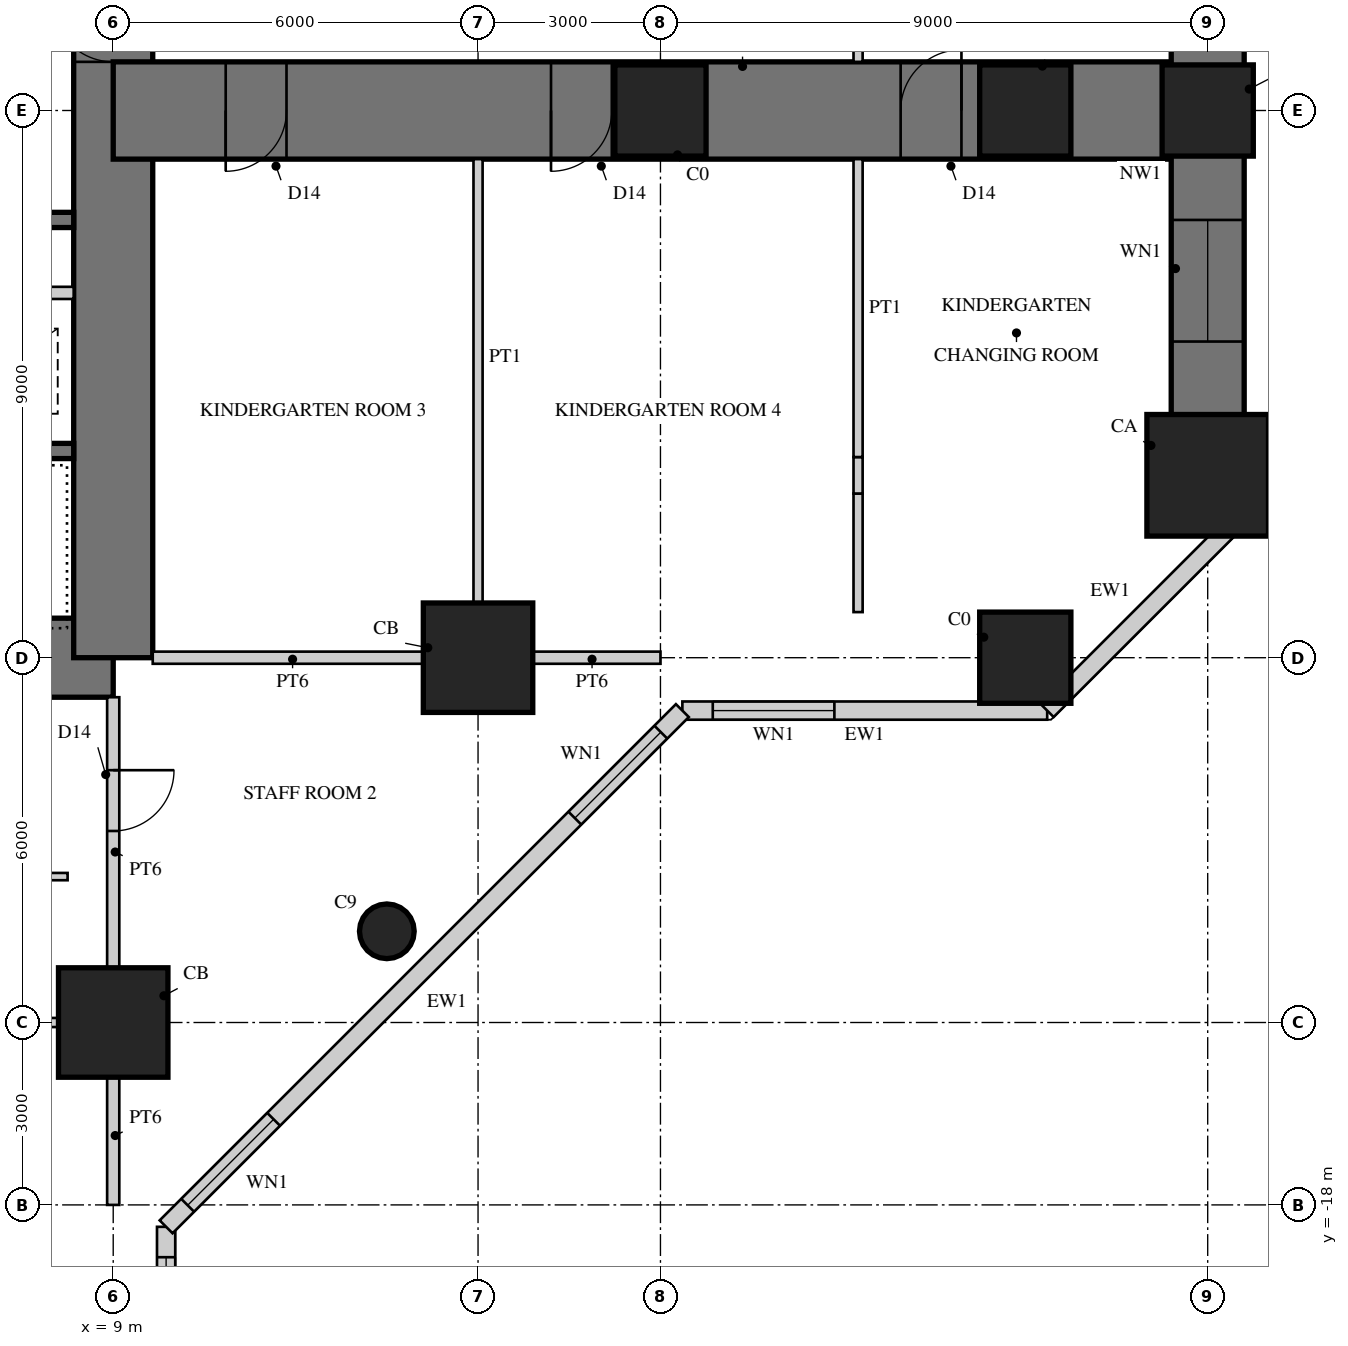
"""IFC4 building model, lengths in metres.
Left out: names, types, materials, properties, quantities, classifications, styles, units other than length and angle.
Written with IfcOpenShell. Run it as: python <this file> out.ifc"""

import sys

from ifc_helpers import new_model, si_unit, direction, frame, frame_2d, origin, origin_2d, place, context, subcontext, project, spatial, rectangle, hollow_rectangle, circle, extrude, element, fill, save


model = new_model("IFC4")
c1 = context("Model", 3, precision=1e-05, world=origin(), true_north=direction((0.0, 1.0)))
c2 = subcontext(c1, "Body", "Model", "MODEL_VIEW")
j1 = project(units=[si_unit("LENGTHUNIT", "METRE"), si_unit("PLANEANGLEUNIT", "RADIAN")], contexts=[c1])
p1 = place(None, origin())
s1 = spatial("IfcSite", under=j1, at=p1, CompositionType="ELEMENT")
p2 = place(p1, origin())
s2 = spatial("IfcBuilding", under=s1, at=p2, CompositionType="ELEMENT")
p3 = place(p2, frame((0.0, 0.0, 5.0)))
s3 = spatial("IfcBuildingStorey", under=s2, at=p3, CompositionType="ELEMENT", Elevation=5.0)
p4 = place(p3, frame((-9.0, -9.0, 0.0), z_axis=(0.0, 0.0, 1.0), x_axis=(1.0, 0.0, 0.0)))
e1 = element("IfcWall", 1, at=p4, inside=s3, PredefinedType="SHEAR", context=c2, shape_type="SweptSolid", body=[
    extrude(rectangle(XDim=18.0, YDim=1.3, at=frame_2d((9.0, 0.0))), origin(), (0.0, 0.0, 1.0), 4.5),
])
p5 = place(p4, frame((9.8, 0.0, 0.0)))
e2 = element("IfcOpeningElement", 2, at=p5, cuts=e1, PredefinedType="OPENING", context=c2, shape_type="SweptSolid", body=[
    extrude(rectangle(XDim=1.0, YDim=2.4, at=frame_2d((0.5, 1.2))), frame((0.0, 0.66, 0.0), z_axis=(0.0, -1.0, 0.0), x_axis=(1.0, 0.0, 0.0)), (0.0, 0.0, 1.0), 1.32),
])
p6 = place(p3, frame((9.0, -9.0, 0.0), z_axis=(0.0, 0.0, 1.0), x_axis=(0.0, 1.0, 0.0)))
e3 = element("IfcWall", 3, at=p6, inside=s3, PredefinedType="SHEAR", context=c2, shape_type="SweptSolid", body=[
    extrude(rectangle(XDim=18.0, YDim=1.3, at=frame_2d((9.0, 0.0))), origin(), (0.0, 0.0, 1.0), 4.5),
])
p7 = place(p6, frame((9.8, 0.0, 0.0)))
e4 = element("IfcOpeningElement", 4, at=p7, cuts=e3, PredefinedType="OPENING", context=c2, shape_type="SweptSolid", body=[
    extrude(rectangle(XDim=1.0, YDim=2.4, at=frame_2d((0.5, 1.2))), frame((0.0, 0.66, 0.0), z_axis=(0.0, -1.0, 0.0), x_axis=(1.0, 0.0, 0.0)), (0.0, 0.0, 1.0), 1.32),
])
p8 = place(p3, frame((2.125, -1.8, 0.0), z_axis=(0.0, 0.0, 1.0), x_axis=(1.0, 0.0, 0.0)))
e5 = element("IfcWall", 5, at=p8, inside=s3, PredefinedType="SHEAR", context=c2, shape_type="SweptSolid", body=[
    extrude(rectangle(XDim=6.225, YDim=0.25, at=frame_2d((3.113, 0.0))), origin(), (0.0, 0.0, 1.0), 4.5),
])
p9 = place(p3, frame((2.125, -5.6, 0.0), z_axis=(0.0, 0.0, 1.0), x_axis=(1.0, 0.0, 0.0)))
e6 = element("IfcWall", 6, at=p9, inside=s3, PredefinedType="SHEAR", context=c2, shape_type="SweptSolid", body=[
    extrude(rectangle(XDim=6.225, YDim=0.25, at=frame_2d((3.113, 0.0))), origin(), (0.0, 0.0, 1.0), 4.5),
])
p10 = place(p9, frame((0.175, 0.0, 0.0)))
e7 = element("IfcOpeningElement", 7, at=p10, cuts=e6, PredefinedType="OPENING", context=c2, shape_type="SweptSolid", body=[
    extrude(rectangle(XDim=1.0, YDim=2.1, at=frame_2d((0.5, 1.05))), frame((0.0, 0.135, 0.0), z_axis=(0.0, -1.0, 0.0), x_axis=(1.0, 0.0, 0.0)), (0.0, 0.0, 1.0), 0.27),
])
p11 = place(p3, frame((5.725, -3.0, 0.0), z_axis=(0.0, 0.0, 1.0), x_axis=(1.0, 0.0, 0.0)))
e8 = element("IfcWall", 8, at=p11, inside=s3, PredefinedType="PARTITIONING", context=c2, shape_type="SweptSolid", body=[
    extrude(rectangle(XDim=2.625, YDim=0.2, at=frame_2d((1.312, 0.0))), origin(), (0.0, 0.0, 1.0), 4.5),
])
p12 = place(p3, frame((9.0, 0.0, 0.0), z_axis=(0.0, 0.0, 1.0), x_axis=(1.0, 0.0, 0.0)))
e9 = element("IfcWall", 9, at=p12, inside=s3, PredefinedType="SHEAR", context=c2, shape_type="SweptSolid", body=[
    extrude(rectangle(XDim=18.0, YDim=1.6, at=frame_2d((9.0, 0.0))), origin(), (0.0, 0.0, 1.0), 4.5),
])
p13 = place(p12, frame((1.85, 0.0, 0.0)))
e10 = element("IfcOpeningElement", 10, at=p13, cuts=e9, PredefinedType="OPENING", context=c2, shape_type="SweptSolid", body=[
    extrude(rectangle(XDim=1.0, YDim=2.2, at=frame_2d((0.5, 1.1))), frame((0.0, 0.81, 0.0), z_axis=(0.0, -1.0, 0.0), x_axis=(1.0, 0.0, 0.0)), (0.0, 0.0, 1.0), 1.62),
])
p14 = place(p12, frame((7.2, 0.0, 0.0)))
e11 = element("IfcOpeningElement", 11, at=p14, cuts=e9, PredefinedType="OPENING", context=c2, shape_type="SweptSolid", body=[
    extrude(rectangle(XDim=1.0, YDim=2.2, at=frame_2d((0.5, 1.1))), frame((0.0, 0.81, 0.0), z_axis=(0.0, -1.0, 0.0), x_axis=(1.0, 0.0, 0.0)), (0.0, 0.0, 1.0), 1.62),
])
p15 = place(p12, frame((12.95, 0.0, 0.0)))
e12 = element("IfcOpeningElement", 12, at=p15, cuts=e9, PredefinedType="OPENING", context=c2, shape_type="SweptSolid", body=[
    extrude(rectangle(XDim=1.0, YDim=2.2, at=frame_2d((0.5, 1.1))), frame((0.0, 0.81, 0.0), z_axis=(0.0, -1.0, 0.0), x_axis=(1.0, 0.0, 0.0)), (0.0, 0.0, 1.0), 1.62),
])
p16 = place(p3, frame((27.0, -6.0, 0.0), z_axis=(0.0, 0.0, 1.0), x_axis=(0.0, 1.0, 0.0)))
e13 = element("IfcWall", 13, at=p16, inside=s3, PredefinedType="SHEAR", context=c2, shape_type="SweptSolid", body=[
    extrude(rectangle(XDim=12.0, YDim=1.2, at=frame_2d((6.0, 0.0))), origin(), (0.0, 0.0, 1.0), 4.5),
])
p17 = place(p16, frame((2.2, 0.0, 0.9)))
e14 = element("IfcOpeningElement", 14, at=p17, cuts=e13, PredefinedType="OPENING", context=c2, shape_type="SweptSolid", body=[
    extrude(rectangle(XDim=2.0, YDim=1.8, at=frame_2d((1.0, 0.9))), frame((0.0, 0.61, 0.0), z_axis=(0.0, -1.0, 0.0), x_axis=(1.0, 0.0, 0.0)), (0.0, 0.0, 1.0), 1.22),
])
p18 = place(p16, frame((7.8, 0.0, 0.9)))
e15 = element("IfcOpeningElement", 15, at=p18, cuts=e13, PredefinedType="OPENING", context=c2, shape_type="SweptSolid", body=[
    extrude(rectangle(XDim=2.0, YDim=1.8, at=frame_2d((1.0, 0.9))), frame((0.0, 0.61, 0.0), z_axis=(0.0, -1.0, 0.0), x_axis=(1.0, 0.0, 0.0)), (0.0, 0.0, 1.0), 1.22),
])
p19 = place(p3, frame((15.0, -9.0, 0.0), z_axis=(0.0, 0.0, 1.0), x_axis=(1.0, 0.0, 0.0)))
e16 = element("IfcColumn", 16, at=p19, inside=s3, PredefinedType="COLUMN", context=c2, shape_type="SweptSolid", body=[
    extrude(rectangle(XDim=1.8, YDim=1.8, at=origin_2d()), origin(), (0.0, 0.0, 1.0), 4.5),
])
p20 = place(p3, frame((24.0, -9.0, 0.0), z_axis=(0.0, 0.0, 1.0), x_axis=(1.0, 0.0, 0.0)))
e17 = element("IfcColumn", 17, at=p20, inside=s3, PredefinedType="COLUMN", context=c2, shape_type="SweptSolid", body=[
    extrude(rectangle(XDim=1.5, YDim=1.5, at=origin_2d()), origin(), (0.0, 0.0, 1.0), 4.5),
])
p21 = place(p3, frame((27.0, -6.0, 0.0), z_axis=(0.0, 0.0, 1.0), x_axis=(1.0, 0.0, 0.0)))
e18 = element("IfcColumn", 18, at=p21, inside=s3, PredefinedType="COLUMN", context=c2, shape_type="SweptSolid", body=[
    extrude(rectangle(XDim=2.0, YDim=2.0, at=origin_2d()), origin(), (0.0, 0.0, 1.0), 4.5),
])
p22 = place(p3, frame((27.0, 0.0, 0.0), z_axis=(0.0, 0.0, 1.0), x_axis=(1.0, 0.0, 0.0)))
e19 = element("IfcColumn", 19, at=p22, inside=s3, PredefinedType="COLUMN", context=c2, shape_type="SweptSolid", body=[
    extrude(rectangle(XDim=1.5, YDim=1.5, at=origin_2d()), origin(), (0.0, 0.0, 1.0), 4.5),
])
p23 = place(p3, frame((9.0, -15.0, 0.0), z_axis=(0.0, 0.0, 1.0), x_axis=(1.0, 0.0, 0.0)))
e20 = element("IfcColumn", 20, at=p23, inside=s3, PredefinedType="COLUMN", context=c2, shape_type="SweptSolid", body=[
    extrude(rectangle(XDim=1.8, YDim=1.8, at=origin_2d()), origin(), (0.0, 0.0, 1.0), 4.5),
])
for number, where, z_axis, x_axis in (
    (21, (18.0, 0.0, 0.0), (0.0, 0.0, 1.0), (1.0, 0.0, 0.0)),
    (22, (24.0, 0.0, 0.0), (0.0, 0.0, 1.0), (1.0, 0.0, 0.0)),
):
    element("IfcColumn", number, at=place(p3, frame(where, z_axis=z_axis, x_axis=x_axis)), inside=s3, PredefinedType="COLUMN", context=c2, shape_type="SweptSolid", body=[
        extrude(rectangle(XDim=1.5, YDim=1.5, at=origin_2d()), origin(), (0.0, 0.0, 1.0), 4.5),
    ])
p24 = place(p3, frame((13.5, -13.5, 0.0), z_axis=(0.0, 0.0, 1.0), x_axis=(1.0, 0.0, 0.0)))
e23 = element("IfcColumn", 23, at=p24, inside=s3, PredefinedType="COLUMN", context=c2, shape_type="SweptSolid", body=[
    extrude(circle(Radius=0.45, at=origin_2d()), origin(), (0.0, 0.0, 1.0), 4.5),
])
p25 = place(p3, frame((18.36, -9.87, 0.0), z_axis=(0.0, 0.0, 1.0), x_axis=(1.0, 0.0, 0.0)))
e24 = element("IfcWall", 24, at=p25, inside=s3, PredefinedType="SOLIDWALL", context=c2, shape_type="SweptSolid", body=[
    extrude(rectangle(XDim=6.0, YDim=0.3, at=frame_2d((3.0, 0.0))), origin(), (0.0, 0.0, 1.0), 4.3),
])
p26 = place(p25, frame((0.5, 0.0, 0.9)))
e25 = element("IfcOpeningElement", 25, at=p26, cuts=e24, PredefinedType="OPENING", context=c2, shape_type="SweptSolid", body=[
    extrude(rectangle(XDim=2.0, YDim=1.8, at=frame_2d((1.0, 0.9))), frame((0.0, 0.16, 0.0), z_axis=(0.0, -1.0, 0.0), x_axis=(1.0, 0.0, 0.0)), (0.0, 0.0, 1.0), 0.32),
])
p27 = place(p3, frame((24.36, -9.87, 0.0), z_axis=(0.0, 0.0, 1.0), x_axis=(0.707106781187, 0.707106781187, 0.0)))
e26 = element("IfcWall", 26, at=p27, inside=s3, PredefinedType="SOLIDWALL", context=c2, shape_type="SweptSolid", body=[
    extrude(rectangle(XDim=4.582, YDim=0.3, at=frame_2d((2.291, 0.0))), origin(), (0.0, 0.0, 1.0), 4.3),
])
p28 = place(p3, frame((9.87, -24.36, 0.0), z_axis=(0.0, 0.0, 1.0), x_axis=(0.0, 1.0, 0.0)))
e27 = element("IfcWall", 27, at=p28, inside=s3, PredefinedType="SOLIDWALL", context=c2, shape_type="SweptSolid", body=[
    extrude(rectangle(XDim=6.0, YDim=0.3, at=frame_2d((3.0, 0.0))), origin(), (0.0, 0.0, 1.0), 4.3),
])
p29 = place(p28, frame((3.5, 0.0, 0.9)))
e28 = element("IfcOpeningElement", 28, at=p29, cuts=e27, PredefinedType="OPENING", context=c2, shape_type="SweptSolid", body=[
    extrude(rectangle(XDim=2.0, YDim=1.8, at=frame_2d((1.0, 0.9))), frame((0.0, 0.16, 0.0), z_axis=(0.0, -1.0, 0.0), x_axis=(1.0, 0.0, 0.0)), (0.0, 0.0, 1.0), 0.32),
])
p30 = place(p3, frame((9.87, -18.36, 0.0), z_axis=(0.0, 0.0, 1.0), x_axis=(0.707106781187, 0.707106781187, 0.0)))
e29 = element("IfcWall", 29, at=p30, inside=s3, PredefinedType="SOLIDWALL", context=c2, shape_type="SweptSolid", body=[
    extrude(rectangle(XDim=12.007, YDim=0.3, at=frame_2d((6.003, 0.0))), origin(), (0.0, 0.0, 1.0), 4.3),
])
p31 = place(p30, frame((0.501, 0.0, 0.9)))
e30 = element("IfcOpeningElement", 30, at=p31, cuts=e29, PredefinedType="OPENING", context=c2, shape_type="SweptSolid", body=[
    extrude(rectangle(XDim=2.0, YDim=1.8, at=frame_2d((1.0, 0.9))), frame((0.0, 0.16, 0.0), z_axis=(0.0, -1.0, 0.0), x_axis=(1.0, 0.0, 0.0)), (0.0, 0.0, 1.0), 0.32),
])
p32 = place(p30, frame((9.506, 0.0, 0.9)))
e31 = element("IfcOpeningElement", 31, at=p32, cuts=e29, PredefinedType="OPENING", context=c2, shape_type="SweptSolid", body=[
    extrude(rectangle(XDim=2.0, YDim=1.8, at=frame_2d((1.0, 0.9))), frame((0.0, 0.16, 0.0), z_axis=(0.0, -1.0, 0.0), x_axis=(1.0, 0.0, 0.0)), (0.0, 0.0, 1.0), 0.32),
])
p33 = place(p3, frame((15.0, -8.25, 0.0), z_axis=(0.0, 0.0, 1.0), x_axis=(0.0, 1.0, 0.0)))
e32 = element("IfcWall", 32, at=p33, inside=s3, PredefinedType="PARTITIONING", context=c2, shape_type="SweptSolid", body=[
    extrude(rectangle(XDim=7.45, YDim=0.15, at=frame_2d((3.725, 0.0))), origin(), (0.0, 0.0, 1.0), 3.35),
])
p34 = place(p3, frame((21.25, -8.25, 0.0), z_axis=(0.0, 0.0, 1.0), x_axis=(0.0, 1.0, 0.0)))
e33 = element("IfcWall", 33, at=p34, inside=s3, PredefinedType="PARTITIONING", context=c2, shape_type="SweptSolid", body=[
    extrude(rectangle(XDim=1.95, YDim=0.15, at=frame_2d((0.975, 0.0))), origin(), (0.0, 0.0, 1.0), 3.35),
])
p35 = place(p3, frame((21.25, -6.3, 0.0), z_axis=(0.0, 0.0, 1.0), x_axis=(0.0, 1.0, 0.0)))
e34 = element("IfcWall", 34, at=p35, inside=s3, PredefinedType="PARTITIONING", context=c2, shape_type="SweptSolid", body=[
    extrude(rectangle(XDim=0.6, YDim=0.15, at=frame_2d((0.3, 0.0))), origin(), (0.0, 0.0, 1.0), 4.3),
])
p36 = place(p3, frame((21.25, -5.7, 0.0), z_axis=(0.0, 0.0, 1.0), x_axis=(0.0, 1.0, 0.0)))
e35 = element("IfcWall", 35, at=p36, inside=s3, PredefinedType="PARTITIONING", context=c2, shape_type="SweptSolid", body=[
    extrude(rectangle(XDim=4.9, YDim=0.15, at=frame_2d((2.45, 0.0))), origin(), (0.0, 0.0, 1.0), 3.35),
])
p37 = place(p3, frame((21.25, 0.8, 0.0), z_axis=(0.0, 0.0, 1.0), x_axis=(0.0, 1.0, 0.0)))
e36 = element("IfcWall", 36, at=p37, inside=s3, PredefinedType="PARTITIONING", context=c2, shape_type="SweptSolid", body=[
    extrude(rectangle(XDim=4.9, YDim=0.15, at=frame_2d((2.45, 0.0))), origin(), (0.0, 0.0, 1.0), 3.35),
])
p38 = place(p37, frame((0.35, 0.0, 0.0)))
e37 = element("IfcOpeningElement", 37, at=p38, cuts=e36, PredefinedType="OPENING", context=c2, shape_type="SweptSolid", body=[
    extrude(rectangle(XDim=1.0, YDim=2.2, at=frame_2d((0.5, 1.1))), frame((0.0, 0.085, 0.0), z_axis=(0.0, -1.0, 0.0), x_axis=(1.0, 0.0, 0.0)), (0.0, 0.0, 1.0), 0.17),
])
p39 = place(p3, frame((2.575, -15.0, 0.0), z_axis=(0.0, 0.0, 1.0), x_axis=(1.0, 0.0, 0.0)))
e38 = element("IfcWall", 38, at=p39, inside=s3, PredefinedType="PARTITIONING", context=c2, shape_type="SweptSolid", body=[
    extrude(rectangle(XDim=5.675, YDim=0.15, at=frame_2d((2.837, 0.0))), origin(), (0.0, 0.0, 1.0), 3.35),
])
p40 = place(p3, frame((2.575, -12.6, 0.0), z_axis=(0.0, 0.0, 1.0), x_axis=(1.0, 0.0, 0.0)))
e39 = element("IfcWall", 39, at=p40, inside=s3, PredefinedType="PLUMBINGWALL", context=c2, shape_type="SweptSolid", body=[
    extrude(rectangle(XDim=5.675, YDim=0.12, at=frame_2d((2.837, 0.0))), origin(), (0.0, 0.0, 1.0), 4.3),
])
p41 = place(p3, frame((9.0, -9.65, 0.0), z_axis=(0.0, 0.0, 1.0), x_axis=(0.0, -1.0, 0.0)))
e40 = element("IfcWall", 40, at=p41, inside=s3, PredefinedType="SOLIDWALL", context=c2, shape_type="SweptSolid", body=[
    extrude(rectangle(XDim=4.6, YDim=0.2, at=frame_2d((2.3, 0.0))), origin(), (0.0, 0.0, 1.0), 3.3),
])
p42 = place(p41, frame((1.2, 0.0, 0.0)))
e41 = element("IfcOpeningElement", 41, at=p42, cuts=e40, PredefinedType="OPENING", context=c2, shape_type="SweptSolid", body=[
    extrude(rectangle(XDim=1.0, YDim=2.2, at=frame_2d((0.5, 1.1))), frame((0.0, 0.11, 0.0), z_axis=(0.0, -1.0, 0.0), x_axis=(1.0, 0.0, 0.0)), (0.0, 0.0, 1.0), 0.22),
])
p43 = place(p3, frame((9.0, -15.75, 0.0), z_axis=(0.0, 0.0, 1.0), x_axis=(0.0, -1.0, 0.0)))
e42 = element("IfcWall", 42, at=p43, inside=s3, PredefinedType="SOLIDWALL", context=c2, shape_type="SweptSolid", body=[
    extrude(rectangle(XDim=2.25, YDim=0.2, at=frame_2d((1.125, 0.0))), origin(), (0.0, 0.0, 1.0), 3.3),
])
p44 = place(p3, frame((14.25, -9.0, 0.0), z_axis=(0.0, 0.0, 1.0), x_axis=(-1.0, 0.0, 0.0)))
e43 = element("IfcWall", 43, at=p44, inside=s3, PredefinedType="SOLIDWALL", context=c2, shape_type="SweptSolid", body=[
    extrude(rectangle(XDim=4.6, YDim=0.2, at=frame_2d((2.3, 0.0))), origin(), (0.0, 0.0, 1.0), 3.3),
])
p45 = place(p3, frame((18.0, -9.0, 0.0), z_axis=(0.0, 0.0, 1.0), x_axis=(-1.0, 0.0, 0.0)))
e44 = element("IfcWall", 44, at=p45, inside=s3, PredefinedType="SOLIDWALL", context=c2, shape_type="SweptSolid", body=[
    extrude(rectangle(XDim=2.25, YDim=0.2, at=frame_2d((1.125, 0.0))), origin(), (0.0, 0.0, 1.0), 3.3),
])
p46 = place(p26, origin())
e45 = element("IfcWindow", 45, at=p46, inside=s3, PartitioningType="SINGLE_PANEL", PredefinedType="WINDOW", context=c2, shape_type="SweptSolid", body=[
    extrude(hollow_rectangle(XDim=2.0, YDim=1.8, WallThickness=0.06, at=frame_2d((1.0, 0.9))), frame((0.0, 0.03, 0.0), z_axis=(0.0, -1.0, 0.0), x_axis=(1.0, 0.0, 0.0)), (0.0, 0.0, 1.0), 0.06),
    extrude(rectangle(XDim=1.879, YDim=1.679, at=frame_2d((1.0, 0.9))), frame((0.0, 0.03, 0.0), z_axis=(0.0, -1.0, 0.0), x_axis=(1.0, 0.0, 0.0)), (0.0, 0.0, 1.0), 0.06),
])
fill(e25, e45)
p47 = place(p17, origin())
e46 = element("IfcWindow", 46, at=p47, inside=s3, PartitioningType="SINGLE_PANEL", PredefinedType="WINDOW", context=c2, shape_type="SweptSolid", body=[
    extrude(hollow_rectangle(XDim=2.0, YDim=1.8, WallThickness=0.06, at=frame_2d((1.0, 0.9))), frame((0.0, 0.03, 0.0), z_axis=(0.0, -1.0, 0.0), x_axis=(1.0, 0.0, 0.0)), (0.0, 0.0, 1.0), 0.06),
    extrude(rectangle(XDim=1.879, YDim=1.679, at=frame_2d((1.0, 0.9))), frame((0.0, 0.03, 0.0), z_axis=(0.0, -1.0, 0.0), x_axis=(1.0, 0.0, 0.0)), (0.0, 0.0, 1.0), 0.06),
])
fill(e14, e46)
p48 = place(p29, origin())
e47 = element("IfcWindow", 47, at=p48, inside=s3, PartitioningType="SINGLE_PANEL", PredefinedType="WINDOW", context=c2, shape_type="SweptSolid", body=[
    extrude(hollow_rectangle(XDim=2.0, YDim=1.8, WallThickness=0.06, at=frame_2d((1.0, 0.9))), frame((0.0, 0.03, 0.0), z_axis=(0.0, -1.0, 0.0), x_axis=(1.0, 0.0, 0.0)), (0.0, 0.0, 1.0), 0.06),
    extrude(rectangle(XDim=1.879, YDim=1.679, at=frame_2d((1.0, 0.9))), frame((0.0, 0.03, 0.0), z_axis=(0.0, -1.0, 0.0), x_axis=(1.0, 0.0, 0.0)), (0.0, 0.0, 1.0), 0.06),
])
fill(e28, e47)
p49 = place(p31, origin())
e48 = element("IfcWindow", 48, at=p49, inside=s3, PartitioningType="SINGLE_PANEL", PredefinedType="WINDOW", context=c2, shape_type="SweptSolid", body=[
    extrude(hollow_rectangle(XDim=2.0, YDim=1.8, WallThickness=0.06, at=frame_2d((1.0, 0.9))), frame((0.0, 0.03, 0.0), z_axis=(0.0, -1.0, 0.0), x_axis=(1.0, 0.0, 0.0)), (0.0, 0.0, 1.0), 0.06),
    extrude(rectangle(XDim=1.879, YDim=1.679, at=frame_2d((1.0, 0.9))), frame((0.0, 0.03, 0.0), z_axis=(0.0, -1.0, 0.0), x_axis=(1.0, 0.0, 0.0)), (0.0, 0.0, 1.0), 0.06),
])
fill(e30, e48)
p50 = place(p32, origin())
e49 = element("IfcWindow", 49, at=p50, inside=s3, PartitioningType="SINGLE_PANEL", PredefinedType="WINDOW", context=c2, shape_type="SweptSolid", body=[
    extrude(hollow_rectangle(XDim=2.0, YDim=1.8, WallThickness=0.06, at=frame_2d((1.0, 0.9))), frame((0.0, 0.03, 0.0), z_axis=(0.0, -1.0, 0.0), x_axis=(1.0, 0.0, 0.0)), (0.0, 0.0, 1.0), 0.06),
    extrude(rectangle(XDim=1.879, YDim=1.679, at=frame_2d((1.0, 0.9))), frame((0.0, 0.03, 0.0), z_axis=(0.0, -1.0, 0.0), x_axis=(1.0, 0.0, 0.0)), (0.0, 0.0, 1.0), 0.06),
])
fill(e31, e49)
p51 = place(p42, origin())
e50 = element("IfcDoor", 50, at=p51, inside=s3, OperationType="SINGLE_SWING_LEFT", PredefinedType="DOOR", context=c2, shape_type="SweptSolid", body=[
    extrude(rectangle(XDim=1.0, YDim=2.2, at=frame_2d((0.5, 1.1))), frame((0.0, 0.025, 0.0), z_axis=(0.0, -1.0, 0.0), x_axis=(1.0, 0.0, 0.0)), (0.0, 0.0, 1.0), 0.05),
])
fill(e41, e50)
p52 = place(p13, frame((1.0, 0.0, 0.0), z_axis=(0.0, 0.0, 1.0), x_axis=(-1.0, 0.0, 0.0)))
e51 = element("IfcDoor", 51, at=p52, inside=s3, OperationType="SINGLE_SWING_RIGHT", PredefinedType="DOOR", context=c2, shape_type="SweptSolid", body=[
    extrude(rectangle(XDim=1.0, YDim=2.2, at=frame_2d((0.5, 1.1))), frame((0.0, 0.025, 0.0), z_axis=(0.0, -1.0, 0.0), x_axis=(1.0, 0.0, 0.0)), (0.0, 0.0, 1.0), 0.05),
])
fill(e10, e51)
p53 = place(p14, frame((1.0, 0.0, 0.0), z_axis=(0.0, 0.0, 1.0), x_axis=(-1.0, 0.0, 0.0)))
e52 = element("IfcDoor", 52, at=p53, inside=s3, OperationType="SINGLE_SWING_RIGHT", PredefinedType="DOOR", context=c2, shape_type="SweptSolid", body=[
    extrude(rectangle(XDim=1.0, YDim=2.2, at=frame_2d((0.5, 1.1))), frame((0.0, 0.025, 0.0), z_axis=(0.0, -1.0, 0.0), x_axis=(1.0, 0.0, 0.0)), (0.0, 0.0, 1.0), 0.05),
])
fill(e11, e52)
p54 = place(p15, origin())
e53 = element("IfcDoor", 53, at=p54, inside=s3, OperationType="SINGLE_SWING_RIGHT", PredefinedType="DOOR", context=c2, shape_type="SweptSolid", body=[
    extrude(rectangle(XDim=1.0, YDim=2.2, at=frame_2d((0.5, 1.1))), frame((0.0, 0.025, 0.0), z_axis=(0.0, -1.0, 0.0), x_axis=(1.0, 0.0, 0.0)), (0.0, 0.0, 1.0), 0.05),
])
fill(e12, e53)
p55 = place(p7, origin())
e54 = element("IfcDoor", 54, at=p55, inside=s3, OperationType="SINGLE_SWING_RIGHT", PredefinedType="DOOR", context=c2, shape_type="SweptSolid", body=[
    extrude(rectangle(XDim=1.0, YDim=2.4, at=frame_2d((0.5, 1.2))), frame((0.0, 0.055, 0.0), z_axis=(0.0, -1.0, 0.0), x_axis=(1.0, 0.0, 0.0)), (0.0, 0.0, 1.0), 0.05),
])
fill(e4, e54)
save(model, sys.argv[1])
